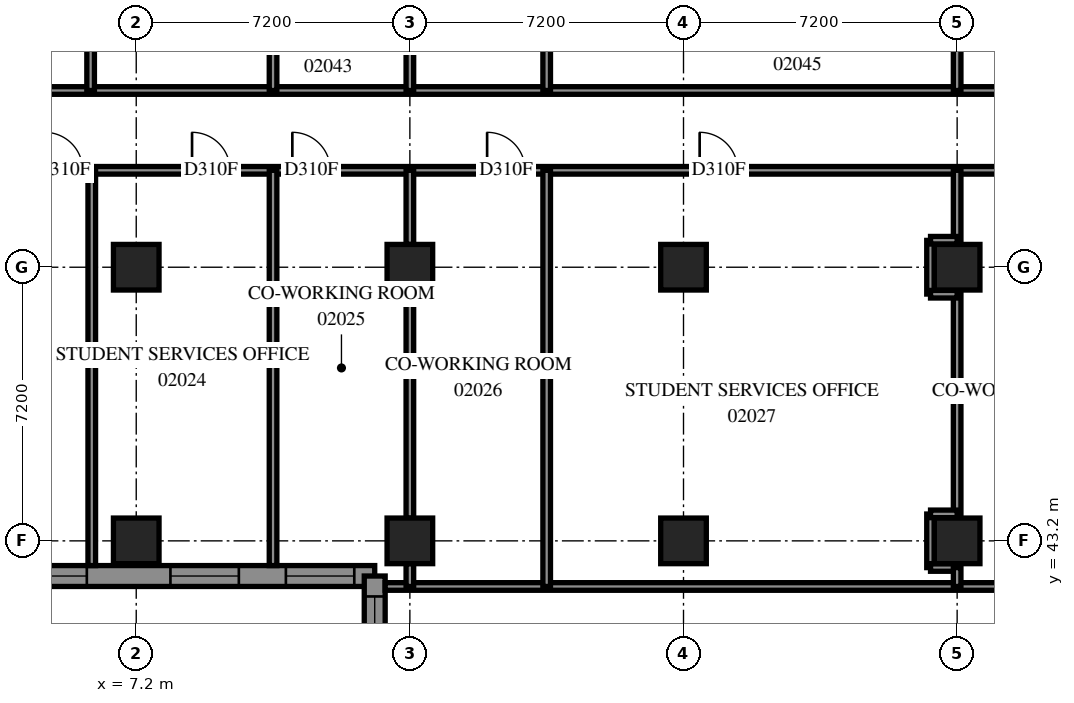
"""IFC4 building model, lengths in metres.
Left out: names, types, materials, properties, quantities, classifications, styles, units other than length and angle.
Written with IfcOpenShell. Run it as: python <this file> out.ifc"""

import sys

from ifc_helpers import new_model, si_unit, direction, frame, frame_2d, origin, origin_2d, place, context, subcontext, project, spatial, polyline, rectangle, outline, extrude, element, fill, save


model = new_model("IFC4")
c1 = context("Model", 3, precision=1e-05, world=origin(), true_north=direction((0.0, 1.0)))
c2 = subcontext(c1, "Body", "Model", "MODEL_VIEW")
j1 = project(units=[si_unit("LENGTHUNIT", "METRE"), si_unit("PLANEANGLEUNIT", "RADIAN")], contexts=[c1])
p1 = place(None, origin())
s1 = spatial("IfcSite", under=j1, at=p1, CompositionType="ELEMENT")
p2 = place(p1, origin())
s2 = spatial("IfcBuilding", under=s1, at=p2, CompositionType="ELEMENT")
p3 = place(p2, frame((0.0, 0.0, 10.2)))
s3 = spatial("IfcBuildingStorey", under=s2, at=p3, CompositionType="ELEMENT", Elevation=10.2)
for number, where, z_axis, x_axis in (
    (1, (7.2, 43.2, 0.0), (0.0, 0.0, 1.0), (1.0, 0.0, 0.0)),
    (2, (7.2, 50.4, 0.0), (0.0, 0.0, 1.0), (1.0, 0.0, 0.0)),
    (3, (14.4, 43.2, 0.0), (0.0, 0.0, 1.0), (1.0, 0.0, 0.0)),
    (4, (14.4, 50.4, 0.0), (0.0, 0.0, 1.0), (1.0, 0.0, 0.0)),
    (5, (21.6, 43.2, 0.0), (0.0, 0.0, 1.0), (1.0, 0.0, 0.0)),
    (6, (21.6, 50.4, 0.0), (0.0, 0.0, 1.0), (1.0, 0.0, 0.0)),
    (7, (28.8, 43.2, 0.0), (0.0, 0.0, 1.0), (1.0, 0.0, 0.0)),
    (8, (28.8, 50.4, 0.0), (0.0, 0.0, 1.0), (1.0, 0.0, 0.0)),
):
    element("IfcColumn", number, at=place(p3, frame(where, z_axis=z_axis, x_axis=x_axis)), inside=s3, PredefinedType="COLUMN", context=c2, shape_type="SweptSolid", body=[
        extrude(rectangle(XDim=1.2, YDim=1.2, at=origin_2d()), origin(), (0.0, 0.0, 1.0), 3.8),
    ])
p4 = place(p3, frame((0.275, 42.275, 0.0), z_axis=(0.0, 0.0, 1.0), x_axis=(1.0, 0.0, 0.0)))
e9 = element("IfcWall", 9, at=p4, inside=s3, PredefinedType="SOLIDWALL", context=c2, shape_type="SweptSolid", body=[
    extrude(outline(polyline([(-0.275, -0.275), (12.925, -0.275), (13.475, 0.275), (0.275, 0.275), (-0.275, -0.275)])), origin(), (0.0, 0.0, 1.0), 3.8),
])
p5 = place(p4, frame((1.0, 0.0, 0.7)))
e10 = element("IfcOpeningElement", 10, at=p5, cuts=e9, PredefinedType="OPENING", context=c2, shape_type="SweptSolid", body=[
    extrude(rectangle(XDim=1.8, YDim=2.6, at=frame_2d((0.9, 1.3))), frame((0.0, 0.285, 0.0), z_axis=(0.0, -1.0, 0.0), x_axis=(1.0, 0.0, 0.0)), (0.0, 0.0, 1.0), 0.57),
])
p6 = place(p4, frame((3.825, 0.0, 0.7)))
e11 = element("IfcOpeningElement", 11, at=p6, cuts=e9, PredefinedType="OPENING", context=c2, shape_type="SweptSolid", body=[
    extrude(rectangle(XDim=1.8, YDim=2.6, at=frame_2d((0.9, 1.3))), frame((0.0, 0.285, 0.0), z_axis=(0.0, -1.0, 0.0), x_axis=(1.0, 0.0, 0.0)), (0.0, 0.0, 1.0), 0.57),
])
p7 = place(p4, frame((7.825, 0.0, 0.7)))
e12 = element("IfcOpeningElement", 12, at=p7, cuts=e9, PredefinedType="OPENING", context=c2, shape_type="SweptSolid", body=[
    extrude(rectangle(XDim=1.8, YDim=2.6, at=frame_2d((0.9, 1.3))), frame((0.0, 0.285, 0.0), z_axis=(0.0, -1.0, 0.0), x_axis=(1.0, 0.0, 0.0)), (0.0, 0.0, 1.0), 0.57),
])
p8 = place(p4, frame((10.863, 0.0, 0.7)))
e13 = element("IfcOpeningElement", 13, at=p8, cuts=e9, PredefinedType="OPENING", context=c2, shape_type="SweptSolid", body=[
    extrude(rectangle(XDim=1.8, YDim=2.6, at=frame_2d((0.9, 1.3))), frame((0.0, 0.285, 0.0), z_axis=(0.0, -1.0, 0.0), x_axis=(1.0, 0.0, 0.0)), (0.0, 0.0, 1.0), 0.57),
])
p9 = place(p3, frame((13.475, 42.275, 0.0), z_axis=(0.0, 0.0, 1.0), x_axis=(0.0, -1.0, 0.0)))
e14 = element("IfcWall", 14, at=p9, inside=s3, PredefinedType="SOLIDWALL", context=c2, shape_type="SweptSolid", body=[
    extrude(outline(polyline([(0.275, -0.275), (21.875, -0.275), (21.325, 0.275), (-0.275, 0.275), (0.275, -0.275)])), origin(), (0.0, 0.0, 1.0), 3.8),
])
p10 = place(p9, frame((0.537, 0.0, 0.7)))
e15 = element("IfcOpeningElement", 15, at=p10, cuts=e14, PredefinedType="OPENING", context=c2, shape_type="SweptSolid", body=[
    extrude(rectangle(XDim=1.8, YDim=2.6, at=frame_2d((0.9, 1.3))), frame((0.0, 0.285, 0.0), z_axis=(0.0, -1.0, 0.0), x_axis=(1.0, 0.0, 0.0)), (0.0, 0.0, 1.0), 0.57),
])
p11 = place(p9, frame((3.575, 0.0, 0.7)))
e16 = element("IfcOpeningElement", 16, at=p11, cuts=e14, PredefinedType="OPENING", context=c2, shape_type="SweptSolid", body=[
    extrude(rectangle(XDim=1.8, YDim=2.6, at=frame_2d((0.9, 1.3))), frame((0.0, 0.285, 0.0), z_axis=(0.0, -1.0, 0.0), x_axis=(1.0, 0.0, 0.0)), (0.0, 0.0, 1.0), 0.57),
])
p12 = place(p9, frame((7.175, 0.0, 0.7)))
e17 = element("IfcOpeningElement", 17, at=p12, cuts=e14, PredefinedType="OPENING", context=c2, shape_type="SweptSolid", body=[
    extrude(rectangle(XDim=1.8, YDim=2.6, at=frame_2d((0.9, 1.3))), frame((0.0, 0.285, 0.0), z_axis=(0.0, -1.0, 0.0), x_axis=(1.0, 0.0, 0.0)), (0.0, 0.0, 1.0), 0.57),
])
p13 = place(p9, frame((10.775, 0.0, 0.7)))
e18 = element("IfcOpeningElement", 18, at=p13, cuts=e14, PredefinedType="OPENING", context=c2, shape_type="SweptSolid", body=[
    extrude(rectangle(XDim=1.8, YDim=2.6, at=frame_2d((0.9, 1.3))), frame((0.0, 0.285, 0.0), z_axis=(0.0, -1.0, 0.0), x_axis=(1.0, 0.0, 0.0)), (0.0, 0.0, 1.0), 0.57),
])
p14 = place(p9, frame((14.375, 0.0, 0.7)))
e19 = element("IfcOpeningElement", 19, at=p14, cuts=e14, PredefinedType="OPENING", context=c2, shape_type="SweptSolid", body=[
    extrude(rectangle(XDim=1.8, YDim=2.6, at=frame_2d((0.9, 1.3))), frame((0.0, 0.285, 0.0), z_axis=(0.0, -1.0, 0.0), x_axis=(1.0, 0.0, 0.0)), (0.0, 0.0, 1.0), 0.57),
])
p15 = place(p9, frame((17.975, 0.0, 0.7)))
e20 = element("IfcOpeningElement", 20, at=p15, cuts=e14, PredefinedType="OPENING", context=c2, shape_type="SweptSolid", body=[
    extrude(rectangle(XDim=1.8, YDim=2.6, at=frame_2d((0.9, 1.3))), frame((0.0, 0.285, 0.0), z_axis=(0.0, -1.0, 0.0), x_axis=(1.0, 0.0, 0.0)), (0.0, 0.0, 1.0), 0.57),
])
p16 = place(p3, frame((13.75, 42.0, 0.0), z_axis=(0.0, 0.0, 1.0), x_axis=(1.0, 0.0, 0.0)))
e21 = element("IfcWall", 21, at=p16, inside=s3, PredefinedType="PARTITIONING", context=c2, shape_type="SweptSolid", body=[
    extrude(rectangle(XDim=58.9, YDim=0.2, at=frame_2d((29.45, 0.0))), origin(), (0.0, 0.0, 1.0), 3.8),
])
p17 = place(p3, frame((0.0, 55.05, 0.0), z_axis=(0.0, 0.0, 1.0), x_axis=(1.0, 0.0, 0.0)))
e22 = element("IfcWall", 22, at=p17, inside=s3, PredefinedType="PARTITIONING", context=c2, shape_type="SweptSolid", body=[
    extrude(rectangle(XDim=54.5, YDim=0.2, at=frame_2d((27.25, 0.0))), origin(), (0.0, 0.0, 1.0), 3.8),
])
p18 = place(p17, frame((52.452, 0.0, 0.0)))
e23 = element("IfcOpeningElement", 23, at=p18, cuts=e22, PredefinedType="OPENING", context=c2, shape_type="SweptSolid", body=[
    extrude(rectangle(XDim=1.0, YDim=2.1, at=frame_2d((0.5, 1.05))), frame((0.0, 0.11, 0.0), z_axis=(0.0, -1.0, 0.0), x_axis=(1.0, 0.0, 0.0)), (0.0, 0.0, 1.0), 0.22),
])
p19 = place(p17, frame((2.42, 0.0, 0.0)))
e24 = element("IfcOpeningElement", 24, at=p19, cuts=e22, PredefinedType="OPENING", context=c2, shape_type="SweptSolid", body=[
    extrude(rectangle(XDim=1.0, YDim=2.1, at=frame_2d((0.5, 1.05))), frame((0.0, 0.11, 0.0), z_axis=(0.0, -1.0, 0.0), x_axis=(1.0, 0.0, 0.0)), (0.0, 0.0, 1.0), 0.22),
])
p20 = place(p3, frame((0.0, 52.95, 0.0), z_axis=(0.0, 0.0, 1.0), x_axis=(1.0, 0.0, 0.0)))
e25 = element("IfcWall", 25, at=p20, inside=s3, PredefinedType="PARTITIONING", context=c2, shape_type="SweptSolid", body=[
    extrude(rectangle(XDim=54.5, YDim=0.2, at=frame_2d((27.25, 0.0))), origin(), (0.0, 0.0, 1.0), 3.8),
])
p21 = place(p20, frame((8.669, 0.0, 0.0)))
e26 = element("IfcOpeningElement", 26, at=p21, cuts=e25, PredefinedType="OPENING", context=c2, shape_type="SweptSolid", body=[
    extrude(rectangle(XDim=1.0, YDim=2.1, at=frame_2d((0.5, 1.05))), frame((0.0, 0.11, 0.0), z_axis=(0.0, -1.0, 0.0), x_axis=(1.0, 0.0, 0.0)), (0.0, 0.0, 1.0), 0.22),
])
p22 = place(p20, frame((11.307, 0.0, 0.0)))
e27 = element("IfcOpeningElement", 27, at=p22, cuts=e25, PredefinedType="OPENING", context=c2, shape_type="SweptSolid", body=[
    extrude(rectangle(XDim=1.0, YDim=2.1, at=frame_2d((0.5, 1.05))), frame((0.0, 0.11, 0.0), z_axis=(0.0, -1.0, 0.0), x_axis=(1.0, 0.0, 0.0)), (0.0, 0.0, 1.0), 0.22),
])
p23 = place(p20, frame((16.433, 0.0, 0.0)))
e28 = element("IfcOpeningElement", 28, at=p23, cuts=e25, PredefinedType="OPENING", context=c2, shape_type="SweptSolid", body=[
    extrude(rectangle(XDim=1.0, YDim=2.1, at=frame_2d((0.5, 1.05))), frame((0.0, 0.11, 0.0), z_axis=(0.0, -1.0, 0.0), x_axis=(1.0, 0.0, 0.0)), (0.0, 0.0, 1.0), 0.22),
])
p24 = place(p20, frame((22.025, 0.0, 0.0)))
e29 = element("IfcOpeningElement", 29, at=p24, cuts=e25, PredefinedType="OPENING", context=c2, shape_type="SweptSolid", body=[
    extrude(rectangle(XDim=1.0, YDim=2.1, at=frame_2d((0.5, 1.05))), frame((0.0, 0.11, 0.0), z_axis=(0.0, -1.0, 0.0), x_axis=(1.0, 0.0, 0.0)), (0.0, 0.0, 1.0), 0.22),
])
p25 = place(p20, frame((30.565, 0.0, 0.0)))
e30 = element("IfcOpeningElement", 30, at=p25, cuts=e25, PredefinedType="OPENING", context=c2, shape_type="SweptSolid", body=[
    extrude(rectangle(XDim=1.0, YDim=2.1, at=frame_2d((0.5, 1.05))), frame((0.0, 0.11, 0.0), z_axis=(0.0, -1.0, 0.0), x_axis=(1.0, 0.0, 0.0)), (0.0, 0.0, 1.0), 0.22),
])
p26 = place(p20, frame((32.925, 0.0, 0.0)))
e31 = element("IfcOpeningElement", 31, at=p26, cuts=e25, PredefinedType="OPENING", context=c2, shape_type="SweptSolid", body=[
    extrude(rectangle(XDim=1.0, YDim=2.1, at=frame_2d((0.5, 1.05))), frame((0.0, 0.11, 0.0), z_axis=(0.0, -1.0, 0.0), x_axis=(1.0, 0.0, 0.0)), (0.0, 0.0, 1.0), 0.22),
])
p27 = place(p20, frame((37.765, 0.0, 0.0)))
e32 = element("IfcOpeningElement", 32, at=p27, cuts=e25, PredefinedType="OPENING", context=c2, shape_type="SweptSolid", body=[
    extrude(rectangle(XDim=1.0, YDim=2.1, at=frame_2d((0.5, 1.05))), frame((0.0, 0.11, 0.0), z_axis=(0.0, -1.0, 0.0), x_axis=(1.0, 0.0, 0.0)), (0.0, 0.0, 1.0), 0.22),
])
p28 = place(p20, frame((40.125, 0.0, 0.0)))
e33 = element("IfcOpeningElement", 33, at=p28, cuts=e25, PredefinedType="OPENING", context=c2, shape_type="SweptSolid", body=[
    extrude(rectangle(XDim=1.0, YDim=2.1, at=frame_2d((0.5, 1.05))), frame((0.0, 0.11, 0.0), z_axis=(0.0, -1.0, 0.0), x_axis=(1.0, 0.0, 0.0)), (0.0, 0.0, 1.0), 0.22),
])
p29 = place(p20, frame((44.965, 0.0, 0.0)))
e34 = element("IfcOpeningElement", 34, at=p29, cuts=e25, PredefinedType="OPENING", context=c2, shape_type="SweptSolid", body=[
    extrude(rectangle(XDim=1.0, YDim=2.1, at=frame_2d((0.5, 1.05))), frame((0.0, 0.11, 0.0), z_axis=(0.0, -1.0, 0.0), x_axis=(1.0, 0.0, 0.0)), (0.0, 0.0, 1.0), 0.22),
])
p30 = place(p20, frame((47.325, 0.0, 0.0)))
e35 = element("IfcOpeningElement", 35, at=p30, cuts=e25, PredefinedType="OPENING", context=c2, shape_type="SweptSolid", body=[
    extrude(rectangle(XDim=1.0, YDim=2.1, at=frame_2d((0.5, 1.05))), frame((0.0, 0.11, 0.0), z_axis=(0.0, -1.0, 0.0), x_axis=(1.0, 0.0, 0.0)), (0.0, 0.0, 1.0), 0.22),
])
p31 = place(p20, frame((52.165, 0.0, 0.0)))
e36 = element("IfcOpeningElement", 36, at=p31, cuts=e25, PredefinedType="OPENING", context=c2, shape_type="SweptSolid", body=[
    extrude(rectangle(XDim=1.0, YDim=2.1, at=frame_2d((0.5, 1.05))), frame((0.0, 0.11, 0.0), z_axis=(0.0, -1.0, 0.0), x_axis=(1.0, 0.0, 0.0)), (0.0, 0.0, 1.0), 0.22),
])
p32 = place(p20, frame((2.372, 0.0, 0.0)))
e37 = element("IfcOpeningElement", 37, at=p32, cuts=e25, PredefinedType="OPENING", context=c2, shape_type="SweptSolid", body=[
    extrude(rectangle(XDim=1.0, YDim=2.1, at=frame_2d((0.5, 1.05))), frame((0.0, 0.11, 0.0), z_axis=(0.0, -1.0, 0.0), x_axis=(1.0, 0.0, 0.0)), (0.0, 0.0, 1.0), 0.22),
])
p33 = place(p20, frame((4.792, 0.0, 0.0)))
e38 = element("IfcOpeningElement", 38, at=p33, cuts=e25, PredefinedType="OPENING", context=c2, shape_type="SweptSolid", body=[
    extrude(rectangle(XDim=1.0, YDim=2.1, at=frame_2d((0.5, 1.05))), frame((0.0, 0.11, 0.0), z_axis=(0.0, -1.0, 0.0), x_axis=(1.0, 0.0, 0.0)), (0.0, 0.0, 1.0), 0.22),
])
p34 = place(p3, frame((18.0, 42.0, 0.0), z_axis=(0.0, 0.0, 1.0), x_axis=(0.0, 1.0, 0.0)))
e39 = element("IfcWall", 39, at=p34, inside=s3, PredefinedType="PARTITIONING", context=c2, shape_type="SweptSolid", body=[
    extrude(rectangle(XDim=10.95, YDim=0.2, at=frame_2d((5.475, 0.0))), origin(), (0.0, 0.0, 1.0), 3.8),
])
for number, where, z_axis, x_axis in (
    (40, (6.03, 42.55, 0.0), (0.0, 0.0, 1.0), (0.0, 1.0, 0.0)),
    (41, (10.8, 42.55, 0.0), (0.0, 0.0, 1.0), (0.0, 1.0, 0.0)),
):
    element("IfcWall", number, at=place(p3, frame(where, z_axis=z_axis, x_axis=x_axis)), inside=s3, PredefinedType="PARTITIONING", context=c2, shape_type="SweptSolid", body=[
        extrude(rectangle(XDim=10.4, YDim=0.2, at=frame_2d((5.2, 0.0))), origin(), (0.0, 0.0, 1.0), 3.8),
    ])
p35 = place(p3, frame((1.155, 55.051, 0.0), z_axis=(0.0, 0.0, 1.0), x_axis=(0.7071067812, 0.7071067812, 0.0)))
e42 = element("IfcWall", 42, at=p35, inside=s3, PredefinedType="PARTITIONING", context=c2, shape_type="SweptSolid", body=[
    extrude(rectangle(XDim=6.851, YDim=0.2, at=frame_2d((3.425, 0.0))), origin(), (0.0, 0.0, 1.0), 3.8),
])
p36 = place(p3, frame((14.4, 43.8, 0.0), z_axis=(0.0, 0.0, 1.0), x_axis=(0.0, 1.0, 0.0)))
e43 = element("IfcWall", 43, at=p36, inside=s3, PredefinedType="PARTITIONING", context=c2, shape_type="SweptSolid", body=[
    extrude(rectangle(XDim=6.0, YDim=0.2, at=frame_2d((3.0, 0.0))), origin(), (0.0, 0.0, 1.0), 3.8),
])
p37 = place(p3, frame((28.8, 43.906, 0.0), z_axis=(0.0, 0.0, 1.0), x_axis=(0.0, 1.0, 0.0)))
e44 = element("IfcWall", 44, at=p37, inside=s3, PredefinedType="PARTITIONING", context=c2, shape_type="SweptSolid", body=[
    extrude(rectangle(XDim=5.788, YDim=0.2, at=frame_2d((2.894, 0.0))), origin(), (0.0, 0.0, 1.0), 3.8),
])
for number, where, z_axis, x_axis in (
    (45, (10.8, 55.05, 0.0), (0.0, 0.0, 1.0), (0.0, 1.0, 0.0)),
    (46, (18.0, 55.05, 0.0), (0.0, 0.0, 1.0), (0.0, 1.0, 0.0)),
):
    element("IfcWall", number, at=place(p3, frame(where, z_axis=z_axis, x_axis=x_axis)), inside=s3, PredefinedType="PARTITIONING", context=c2, shape_type="SweptSolid", body=[
        extrude(rectangle(XDim=5.1, YDim=0.2, at=frame_2d((2.55, 0.0))), origin(), (0.0, 0.0, 1.0), 3.8),
    ])
p38 = place(p3, frame((6.0, 55.05, 0.0), z_axis=(0.0, 0.0, 1.0), x_axis=(0.0, 1.0, 0.0)))
e47 = element("IfcWall", 47, at=p38, inside=s3, PredefinedType="PARTITIONING", context=c2, shape_type="SweptSolid", body=[
    extrude(rectangle(XDim=4.844, YDim=0.2, at=frame_2d((2.422, 0.0))), origin(), (0.0, 0.0, 1.0), 3.8),
])
p39 = place(p3, frame((14.4, 51.0, 0.0), z_axis=(0.0, 0.0, 1.0), x_axis=(0.0, 1.0, 0.0)))
e48 = element("IfcWall", 48, at=p39, inside=s3, PredefinedType="PARTITIONING", context=c2, shape_type="SweptSolid", body=[
    extrude(rectangle(XDim=1.95, YDim=0.2, at=frame_2d((0.975, 0.0))), origin(), (0.0, 0.0, 1.0), 3.8),
])
for number, where, z_axis, x_axis in (
    (49, (14.4, 55.05, 0.0), (0.0, 0.0, 1.0), (0.0, 1.0, 0.0)),
    (50, (28.8, 51.106, 0.0), (0.0, 0.0, 1.0), (0.0, 1.0, 0.0)),
    (51, (28.8, 55.05, 0.0), (0.0, 0.0, 1.0), (0.0, 1.0, 0.0)),
):
    element("IfcWall", number, at=place(p3, frame(where, z_axis=z_axis, x_axis=x_axis)), inside=s3, PredefinedType="PARTITIONING", context=c2, shape_type="SweptSolid", body=[
        extrude(rectangle(XDim=1.844, YDim=0.2, at=frame_2d((0.922, 0.0))), origin(), (0.0, 0.0, 1.0), 3.8),
    ])
p40 = place(p3, frame((28.1, 49.694, 0.0), z_axis=(0.0, 0.0, 1.0), x_axis=(0.0, 1.0, 0.0)))
e52 = element("IfcWall", 52, at=p40, inside=s3, PredefinedType="PARTITIONING", context=c2, shape_type="SweptSolid", body=[
    extrude(rectangle(XDim=1.412, YDim=0.2, at=frame_2d((0.706, 0.0))), origin(), (0.0, 0.0, 1.0), 3.8),
])
p41 = place(p3, frame((28.1, 42.496, 0.0), z_axis=(0.0, 0.0, 1.0), x_axis=(0.0, 1.0, 0.0)))
e53 = element("IfcWall", 53, at=p41, inside=s3, PredefinedType="PARTITIONING", context=c2, shape_type="SweptSolid", body=[
    extrude(rectangle(XDim=1.41, YDim=0.2, at=frame_2d((0.705, 0.0))), origin(), (0.0, 0.0, 1.0), 3.8),
])
for number, where, z_axis, x_axis in (
    (54, (28.1, 51.11, 0.0), (0.0, 0.0, 1.0), (1.0, 0.0, 0.0)),
    (55, (28.1, 49.69, 0.0), (0.0, 0.0, 1.0), (1.0, 0.0, 0.0)),
    (56, (28.1, 43.91, 0.0), (0.0, 0.0, 1.0), (1.0, 0.0, 0.0)),
    (57, (28.1, 42.5, 0.0), (0.0, 0.0, 1.0), (1.0, 0.0, 0.0)),
):
    element("IfcWall", number, at=place(p3, frame(where, z_axis=z_axis, x_axis=x_axis)), inside=s3, PredefinedType="PARTITIONING", context=c2, shape_type="SweptSolid", body=[
        extrude(rectangle(XDim=0.7, YDim=0.2, at=frame_2d((0.35, 0.0))), origin(), (0.0, 0.0, 1.0), 3.8),
    ])
p42 = place(p3, frame((14.4, 42.0, 0.0), z_axis=(0.0, 0.0, 1.0), x_axis=(0.0, 1.0, 0.0)))
e58 = element("IfcWall", 58, at=p42, inside=s3, PredefinedType="PARTITIONING", context=c2, shape_type="SweptSolid", body=[
    extrude(rectangle(XDim=0.6, YDim=0.2, at=frame_2d((0.3, 0.0))), origin(), (0.0, 0.0, 1.0), 3.2),
])
p43 = place(p3, frame((28.8, 42.0, 0.0), z_axis=(0.0, 0.0, 1.0), x_axis=(0.0, 1.0, 0.0)))
e59 = element("IfcWall", 59, at=p43, inside=s3, PredefinedType="PARTITIONING", context=c2, shape_type="SweptSolid", body=[
    extrude(rectangle(XDim=0.496, YDim=0.2, at=frame_2d((0.248, 0.0))), origin(), (0.0, 0.0, 1.0), 3.8),
])
p44 = place(p6, origin())
e60 = element("IfcWindow", 60, at=p44, inside=s3, PartitioningType="SINGLE_PANEL", PredefinedType="WINDOW", context=c2, shape_type="SweptSolid", body=[
    extrude(rectangle(XDim=1.8, YDim=2.6, at=frame_2d((0.9, 1.3))), frame((0.0, 0.155, 0.0), z_axis=(0.0, -1.0, 0.0), x_axis=(1.0, 0.0, 0.0)), (0.0, 0.0, 1.0), 0.06),
])
fill(e11, e60)
p45 = place(p7, origin())
e61 = element("IfcWindow", 61, at=p45, inside=s3, PartitioningType="SINGLE_PANEL", PredefinedType="WINDOW", context=c2, shape_type="SweptSolid", body=[
    extrude(rectangle(XDim=1.8, YDim=2.6, at=frame_2d((0.9, 1.3))), frame((0.0, 0.155, 0.0), z_axis=(0.0, -1.0, 0.0), x_axis=(1.0, 0.0, 0.0)), (0.0, 0.0, 1.0), 0.06),
])
fill(e12, e61)
p46 = place(p8, origin())
e62 = element("IfcWindow", 62, at=p46, inside=s3, PartitioningType="SINGLE_PANEL", PredefinedType="WINDOW", context=c2, shape_type="SweptSolid", body=[
    extrude(rectangle(XDim=1.8, YDim=2.6, at=frame_2d((0.9, 1.3))), frame((0.0, 0.155, 0.0), z_axis=(0.0, -1.0, 0.0), x_axis=(1.0, 0.0, 0.0)), (0.0, 0.0, 1.0), 0.06),
])
fill(e13, e62)
p47 = place(p10, origin())
e63 = element("IfcWindow", 63, at=p47, inside=s3, PartitioningType="SINGLE_PANEL", PredefinedType="WINDOW", context=c2, shape_type="SweptSolid", body=[
    extrude(rectangle(XDim=1.8, YDim=2.6, at=frame_2d((0.9, 1.3))), frame((0.0, 0.155, 0.0), z_axis=(0.0, -1.0, 0.0), x_axis=(1.0, 0.0, 0.0)), (0.0, 0.0, 1.0), 0.06),
])
fill(e15, e63)
p48 = place(p21, origin())
e64 = element("IfcDoor", 64, at=p48, inside=s3, OperationType="SINGLE_SWING_LEFT", PredefinedType="DOOR", context=c2, shape_type="SweptSolid", body=[
    extrude(rectangle(XDim=1.0, YDim=2.1, at=frame_2d((0.5, 1.05))), frame((0.0, 0.025, 0.0), z_axis=(0.0, -1.0, 0.0), x_axis=(1.0, 0.0, 0.0)), (0.0, 0.0, 1.0), 0.05),
])
fill(e26, e64)
p49 = place(p22, origin())
e65 = element("IfcDoor", 65, at=p49, inside=s3, OperationType="SINGLE_SWING_RIGHT", PredefinedType="DOOR", context=c2, shape_type="SweptSolid", body=[
    extrude(rectangle(XDim=1.0, YDim=2.1, at=frame_2d((0.5, 1.05))), frame((0.0, 0.025, 0.0), z_axis=(0.0, -1.0, 0.0), x_axis=(1.0, 0.0, 0.0)), (0.0, 0.0, 1.0), 0.05),
])
fill(e27, e65)
p50 = place(p23, origin())
e66 = element("IfcDoor", 66, at=p50, inside=s3, OperationType="SINGLE_SWING_LEFT", PredefinedType="DOOR", context=c2, shape_type="SweptSolid", body=[
    extrude(rectangle(XDim=1.0, YDim=2.1, at=frame_2d((0.5, 1.05))), frame((0.0, 0.025, 0.0), z_axis=(0.0, -1.0, 0.0), x_axis=(1.0, 0.0, 0.0)), (0.0, 0.0, 1.0), 0.05),
])
fill(e28, e66)
p51 = place(p24, origin())
e67 = element("IfcDoor", 67, at=p51, inside=s3, OperationType="SINGLE_SWING_RIGHT", PredefinedType="DOOR", context=c2, shape_type="SweptSolid", body=[
    extrude(rectangle(XDim=1.0, YDim=2.1, at=frame_2d((0.5, 1.05))), frame((0.0, 0.025, 0.0), z_axis=(0.0, -1.0, 0.0), x_axis=(1.0, 0.0, 0.0)), (0.0, 0.0, 1.0), 0.05),
])
fill(e29, e67)
p52 = place(p33, origin())
e68 = element("IfcDoor", 68, at=p52, inside=s3, OperationType="SINGLE_SWING_LEFT", PredefinedType="DOOR", context=c2, shape_type="SweptSolid", body=[
    extrude(rectangle(XDim=1.0, YDim=2.1, at=frame_2d((0.5, 1.05))), frame((0.0, 0.025, 0.0), z_axis=(0.0, -1.0, 0.0), x_axis=(1.0, 0.0, 0.0)), (0.0, 0.0, 1.0), 0.05),
])
fill(e38, e68)
save(model, sys.argv[1])
